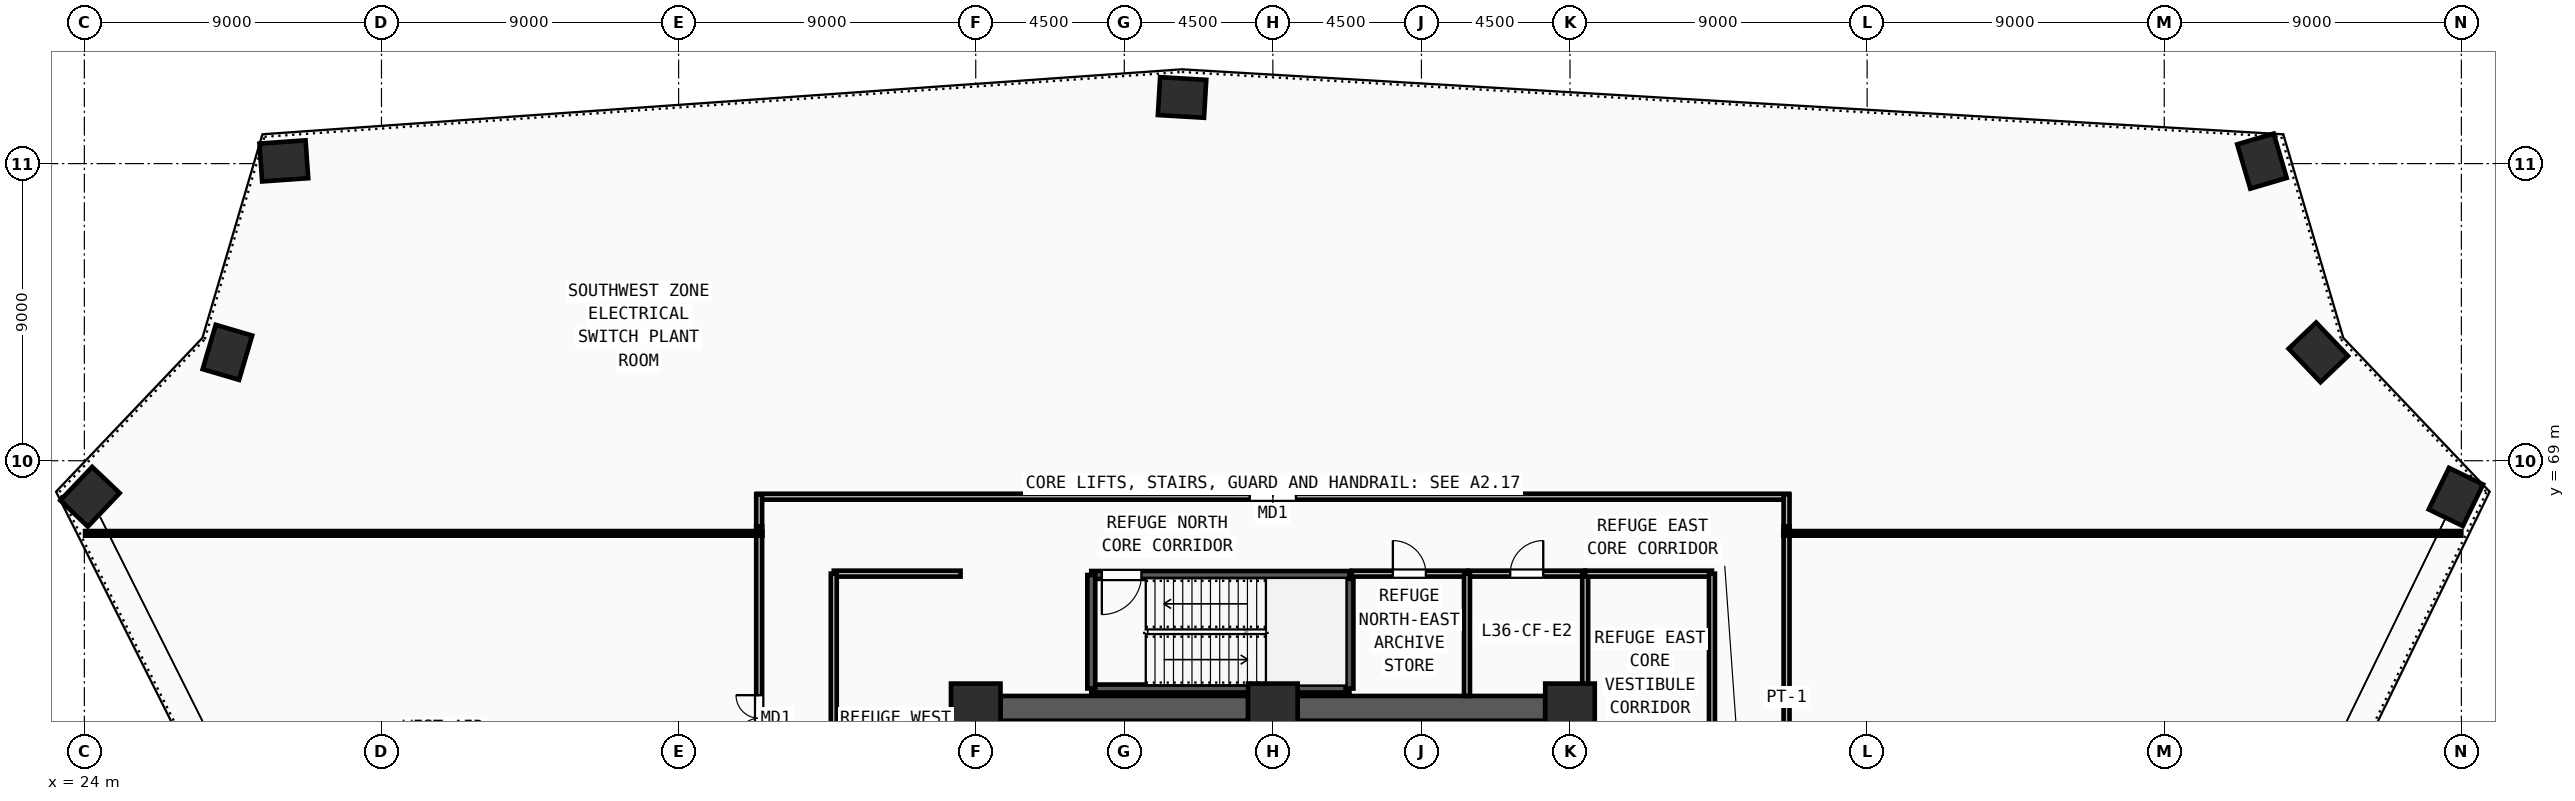
"""IFC4 building model, lengths in metres.
Left out: names, types, materials, properties, quantities, classifications, styles, units other than length and angle.
Written with IfcOpenShell. Run it as: python <this file> out.ifc"""

import sys

from ifc_helpers import new_model, si_unit, direction, frame, frame_2d, origin, origin_2d, place, context, subcontext, project, spatial, rectangle, extrude, source, transform, mapped, element, fill, save


model = new_model("IFC4")
c1 = context("Model", 3, precision=1e-05, world=origin(), true_north=direction((0.0, 1.0)))
c2 = subcontext(c1, "Body", "Model", "MODEL_VIEW")
j1 = project(units=[si_unit("LENGTHUNIT", "METRE"), si_unit("PLANEANGLEUNIT", "RADIAN")], contexts=[c1])
p1 = place(None, origin())
s1 = spatial("IfcSite", under=j1, at=p1, CompositionType="ELEMENT")
p2 = place(p1, origin())
s2 = spatial("IfcBuilding", under=s1, at=p2, CompositionType="ELEMENT")
p3 = place(p2, frame((0.0, 0.0, 139.5)))
s3 = spatial("IfcBuildingStorey", under=s2, at=p3, CompositionType="ELEMENT", Elevation=139.5)
m1 = source(origin(), c2, "Body", "SweptSolid", [
    extrude(rectangle(XDim=1.5, YDim=1.5, at=origin_2d()), origin(), (0.0, 0.0, 1.0), 4.5),
])
for number, where, z_axis, x_axis in (
    (1, (69.0, 61.5, 0.0), (0.0, 0.0, 1.0), (1.0, 0.0, 0.0)),
    (2, (60.0, 61.5, 0.0), (0.0, 0.0, 1.0), (1.0, 0.0, 0.0)),
    (3, (51.0, 61.5, 0.0), (0.0, 0.0, 1.0), (1.0, 0.0, 0.0)),
):
    element("IfcColumn", number, at=place(p3, frame(where, z_axis=z_axis, x_axis=x_axis)), inside=s3, PredefinedType="COLUMN", context=c2, shape_type="MappedRepresentation", body=[
        mapped(m1, transform((0.0, 0.0, 0.0), x_axis=(1.0, 0.0, 0.0), y_axis=(0.0, 1.0, 0.0), z_axis=(0.0, 0.0, 1.0), scale=1.0)),
    ])
m2 = source(origin(), c2, "Body", "SweptSolid", [
    extrude(rectangle(XDim=1.4, YDim=1.15, at=origin_2d()), origin(), (0.0, 0.0, 1.0), 4.5),
])
for number, where, z_axis, x_axis in (
    (4, (24.171, 67.909, 0.0), (0.0, 0.0, 1.0), (0.689, 0.724, 0.0)),
    (5, (28.333, 72.283, 0.0), (0.0, 0.0, 1.0), (0.283, 0.959, 0.0)),
    (6, (30.043, 78.082, 0.0), (0.0, 0.0, 1.0), (0.998, 0.07, 0.0)),
    (7, (57.25, 80.004, 0.0), (0.0, 0.0, 1.0), (-0.998, 0.059, 0.0)),
    (8, (89.96, 78.075, 0.0), (0.0, 0.0, 1.0), (-0.283, 0.959, 0.0)),
    (9, (91.667, 72.283, 0.0), (0.0, 0.0, 1.0), (-0.689, 0.724, 0.0)),
    (10, (95.834, 67.903, 0.0), (0.0, 0.0, 1.0), (0.438, 0.899, 0.0)),
):
    element("IfcColumn", number, at=place(p3, frame(where, z_axis=z_axis, x_axis=x_axis)), inside=s3, PredefinedType="COLUMN", context=c2, shape_type="MappedRepresentation", body=[
        mapped(m2, transform((0.0, 0.0, 0.0), x_axis=(1.0, 0.0, 0.0), y_axis=(0.0, 1.0, 0.0), z_axis=(0.0, 0.0, 1.0), scale=1.0)),
    ])
for number, where, z_axis, x_axis in (
    (11, (51.75, 61.5, 0.0), (0.0, 0.0, 1.0), (1.0, 0.0, 0.0)),
    (12, (60.75, 61.5, 0.0), (0.0, 0.0, 1.0), (1.0, 0.0, 0.0)),
):
    element("IfcWall", number, at=place(p3, frame(where, z_axis=z_axis, x_axis=x_axis)), inside=s3, PredefinedType="SHEAR", context=c2, shape_type="SweptSolid", body=[
        extrude(rectangle(XDim=7.5, YDim=0.75, at=frame_2d((3.75, 0.0))), origin(), (0.0, 0.0, 1.0), 4.32),
    ])
p4 = place(p3, frame((54.5, 62.1, 0.0), z_axis=(0.0, 0.0, 1.0), x_axis=(1.0, 0.0, 0.0)))
e13 = element("IfcWall", 13, at=p4, inside=s3, PredefinedType="SOLIDWALL", context=c2, shape_type="SweptSolid", body=[
    extrude(rectangle(XDim=7.82, YDim=0.24, at=frame_2d((3.91, 0.0))), origin(), (0.0, 0.0, 1.0), 4.32),
])
p5 = place(p3, frame((62.32, 62.1, 0.0), z_axis=(0.0, 0.0, 1.0), x_axis=(0.0, 1.0, 0.0)))
e14 = element("IfcWall", 14, at=p5, inside=s3, PredefinedType="SOLIDWALL", context=c2, shape_type="SweptSolid", body=[
    extrude(rectangle(XDim=3.44, YDim=0.24, at=frame_2d((1.72, 0.0))), origin(), (0.0, 0.0, 1.0), 4.32),
])
p6 = place(p3, frame((62.32, 65.54, 0.0), z_axis=(0.0, 0.0, 1.0), x_axis=(-1.0, 0.0, 0.0)))
e15 = element("IfcWall", 15, at=p6, inside=s3, PredefinedType="SOLIDWALL", context=c2, shape_type="SweptSolid", body=[
    extrude(rectangle(XDim=7.82, YDim=0.24, at=frame_2d((3.91, 0.0))), origin(), (0.0, 0.0, 1.0), 4.32),
])
m3 = source(origin(), c2, "Body", "SweptSolid", [
    extrude(rectangle(XDim=1.2, YDim=2.2, at=frame_2d((0.6, 1.1))), frame((0.0, 0.13, 0.0), z_axis=(0.0, -1.0, 0.0), x_axis=(1.0, 0.0, 0.0)), (0.0, 0.0, 1.0), 0.26),
])
p7 = place(p6, frame((6.3, 0.0, 0.0)))
e16 = element("IfcOpeningElement", 16, at=p7, cuts=e15, PredefinedType="OPENING", context=c2, shape_type="MappedRepresentation", body=[
    mapped(m3, transform((0.0, 0.0, 0.0), x_axis=(1.0, 0.0, 0.0), y_axis=(0.0, 1.0, 0.0), z_axis=(0.0, 0.0, 1.0), scale=1.0)),
])
p8 = place(p3, frame((54.5, 65.54, 0.0), z_axis=(0.0, 0.0, 1.0), x_axis=(0.0, -1.0, 0.0)))
e17 = element("IfcWall", 17, at=p8, inside=s3, PredefinedType="SOLIDWALL", context=c2, shape_type="SweptSolid", body=[
    extrude(rectangle(XDim=3.44, YDim=0.24, at=frame_2d((1.72, 0.0))), origin(), (0.0, 0.0, 1.0), 4.32),
])
p9 = place(p3, frame((62.39, 65.58, 0.0), z_axis=(0.0, 0.0, 1.0), x_axis=(1.0, 0.0, 0.0)))
e18 = element("IfcWall", 18, at=p9, inside=s3, PredefinedType="PARTITIONING", context=c2, shape_type="SweptSolid", body=[
    extrude(rectangle(XDim=3.49, YDim=0.18, at=frame_2d((1.745, 0.0))), origin(), (0.0, 0.0, 1.0), 4.32),
])
m4 = source(origin(), c2, "Body", "SweptSolid", [
    extrude(rectangle(XDim=1.0, YDim=2.2, at=frame_2d((0.5, 1.1))), frame((0.0, 0.1, 0.0), z_axis=(0.0, -1.0, 0.0), x_axis=(1.0, 0.0, 0.0)), (0.0, 0.0, 1.0), 0.2),
])
p10 = place(p9, frame((1.245, 0.0, 0.0)))
e19 = element("IfcOpeningElement", 19, at=p10, cuts=e18, PredefinedType="OPENING", context=c2, shape_type="MappedRepresentation", body=[
    mapped(m4, transform((0.0, 0.0, 0.0), x_axis=(1.0, 0.0, 0.0), y_axis=(0.0, 1.0, 0.0), z_axis=(0.0, 0.0, 1.0), scale=1.0)),
])
p11 = place(p3, frame((65.92, 65.58, 0.0), z_axis=(0.0, 0.0, 1.0), x_axis=(1.0, 0.0, 0.0)))
e20 = element("IfcWall", 20, at=p11, inside=s3, PredefinedType="PARTITIONING", context=c2, shape_type="SweptSolid", body=[
    extrude(rectangle(XDim=3.54, YDim=0.18, at=frame_2d((1.77, 0.0))), origin(), (0.0, 0.0, 1.0), 4.32),
])
p12 = place(p11, frame((1.27, 0.0, 0.0)))
e21 = element("IfcOpeningElement", 21, at=p12, cuts=e20, PredefinedType="OPENING", context=c2, shape_type="MappedRepresentation", body=[
    mapped(m4, transform((0.0, 0.0, 0.0), x_axis=(1.0, 0.0, 0.0), y_axis=(0.0, 1.0, 0.0), z_axis=(0.0, 0.0, 1.0), scale=1.0)),
])
p13 = place(p3, frame((75.56, 67.015, 0.0), z_axis=(0.0, 0.0, 1.0), x_axis=(0.0, -1.0, 0.0)))
e22 = element("IfcWall", 22, at=p13, inside=s3, PredefinedType="PARTITIONING", context=c2, shape_type="SweptSolid", body=[
    extrude(rectangle(XDim=22.43, YDim=0.18, at=frame_2d((11.215, 0.0))), origin(), (0.0, 0.0, 1.0), 3.905),
])
m5 = source(origin(), c2, "Body", "SweptSolid", [
    extrude(rectangle(XDim=1.3, YDim=2.2, at=frame_2d((0.65, 1.1))), frame((0.0, 0.1, 0.0), z_axis=(0.0, -1.0, 0.0), x_axis=(1.0, 0.0, 0.0)), (0.0, 0.0, 1.0), 0.2),
])
p14 = place(p13, frame((10.565, 0.0, 0.0)))
e23 = element("IfcOpeningElement", 23, at=p14, cuts=e22, PredefinedType="OPENING", context=c2, shape_type="MappedRepresentation", body=[
    mapped(m5, transform((0.0, 0.0, 0.0), x_axis=(1.0, 0.0, 0.0), y_axis=(0.0, 1.0, 0.0), z_axis=(0.0, 0.0, 1.0), scale=1.0)),
])
p15 = place(p3, frame((44.37, 67.91, 0.0), z_axis=(0.0, 0.0, 1.0), x_axis=(1.0, 0.0, 0.0)))
e24 = element("IfcWall", 24, at=p15, inside=s3, PredefinedType="PARTITIONING", context=c2, shape_type="SweptSolid", body=[
    extrude(rectangle(XDim=31.26, YDim=0.18, at=frame_2d((15.63, 0.0))), origin(), (0.0, 0.0, 1.0), 4.32),
])
m6 = source(origin(), c2, "Body", "SweptSolid", [
    extrude(rectangle(XDim=1.4, YDim=2.25, at=frame_2d((0.7, 1.125))), frame((0.0, 0.1, 0.0), z_axis=(0.0, -1.0, 0.0), x_axis=(1.0, 0.0, 0.0)), (0.0, 0.0, 1.0), 0.2),
])
p16 = place(p15, frame((14.93, 0.0, 0.0)))
e25 = element("IfcOpeningElement", 25, at=p16, cuts=e24, PredefinedType="OPENING", context=c2, shape_type="MappedRepresentation", body=[
    mapped(m6, transform((0.0, 0.0, 0.0), x_axis=(1.0, 0.0, 0.0), y_axis=(0.0, 1.0, 0.0), z_axis=(0.0, 0.0, 1.0), scale=1.0)),
])
p17 = place(p3, frame((44.44, 55.98, 0.0), z_axis=(0.0, 0.0, 1.0), x_axis=(0.0, 1.0, 0.0)))
e26 = element("IfcWall", 26, at=p17, inside=s3, PredefinedType="PARTITIONING", context=c2, shape_type="SweptSolid", body=[
    extrude(rectangle(XDim=11.035, YDim=0.18, at=frame_2d((5.518, 0.0))), origin(), (0.0, 0.0, 1.0), 4.32),
])
p18 = place(p17, frame((4.518, 0.0, 0.0)))
e27 = element("IfcOpeningElement", 27, at=p18, cuts=e26, PredefinedType="OPENING", context=c2, shape_type="MappedRepresentation", body=[
    mapped(m6, transform((0.0, 0.0, 0.0), x_axis=(1.0, 0.0, 0.0), y_axis=(0.0, 1.0, 0.0), z_axis=(0.0, 0.0, 1.0), scale=1.0)),
])
p19 = place(p3, frame((65.88, 61.875, 0.0), z_axis=(0.0, 0.0, 1.0), x_axis=(0.0, 1.0, 0.0)))
e28 = element("IfcWall", 28, at=p19, inside=s3, PredefinedType="PARTITIONING", context=c2, shape_type="SweptSolid", body=[
    extrude(rectangle(XDim=3.705, YDim=0.18, at=frame_2d((1.853, 0.0))), origin(), (0.0, 0.0, 1.0), 4.32),
])
p20 = place(p3, frame((69.46, 61.95, 0.0), z_axis=(0.0, 0.0, 1.0), x_axis=(0.0, 1.0, 0.0)))
e29 = element("IfcWall", 29, at=p20, inside=s3, PredefinedType="PARTITIONING", context=c2, shape_type="SweptSolid", body=[
    extrude(rectangle(XDim=3.63, YDim=0.18, at=frame_2d((1.815, 0.0))), origin(), (0.0, 0.0, 1.0), 4.32),
])
for number, where, z_axis, x_axis in (
    (30, (46.7, 65.58, 0.0), (0.0, 0.0, 1.0), (1.0, 0.0, 0.0)),
    (31, (69.46, 65.58, 0.0), (0.0, 0.0, 1.0), (1.0, 0.0, 0.0)),
):
    element("IfcWall", number, at=place(p3, frame(where, z_axis=z_axis, x_axis=x_axis)), inside=s3, PredefinedType="PARTITIONING", context=c2, shape_type="SweptSolid", body=[
        extrude(rectangle(XDim=3.84, YDim=0.18, at=frame_2d((1.92, 0.0))), origin(), (0.0, 0.0, 1.0), 4.32),
    ])
for number, where, z_axis, x_axis in (
    (32, (46.7, 60.06, 0.0), (0.0, 0.0, 1.0), (0.0, 1.0, 0.0)),
    (33, (73.3, 60.06, 0.0), (0.0, 0.0, 1.0), (0.0, 1.0, 0.0)),
):
    element("IfcWall", number, at=place(p3, frame(where, z_axis=z_axis, x_axis=x_axis)), inside=s3, PredefinedType="PARTITIONING", context=c2, shape_type="SweptSolid", body=[
        extrude(rectangle(XDim=5.52, YDim=0.18, at=frame_2d((2.76, 0.0))), origin(), (0.0, 0.0, 1.0), 4.32),
    ])
for number, where, z_axis, x_axis in (
    (34, (44.44, 67.015, 0.0), (0.0, 0.0, 1.0), (0.0, 1.0, 0.0)),
    (35, (75.56, 67.98, 0.0), (0.0, 0.0, 1.0), (0.0, -1.0, 0.0)),
):
    element("IfcWall", number, at=place(p3, frame(where, z_axis=z_axis, x_axis=x_axis)), inside=s3, PredefinedType="PARTITIONING", context=c2, shape_type="SweptSolid", body=[
        extrude(rectangle(XDim=0.965, YDim=0.18, at=frame_2d((0.482, 0.0))), origin(), (0.0, 0.0, 1.0), 4.32),
    ])
p21 = place(p3, frame((44.54, 66.8, 0.0), z_axis=(0.0, 0.0, 1.0), x_axis=(-1.0, 0.0, 0.0)))
e36 = element("IfcWall", 36, at=p21, inside=s3, PredefinedType="PARTITIONING", context=c2, shape_type="SweptSolid", body=[
    extrude(rectangle(XDim=20.518, YDim=0.14, at=frame_2d((10.259, 0.0))), origin(), (0.0, 0.0, 1.0), 3.505),
])
p22 = place(p3, frame((75.46, 66.8, 0.0), z_axis=(0.0, 0.0, 1.0), x_axis=(1.0, 0.0, 0.0)))
e37 = element("IfcWall", 37, at=p22, inside=s3, PredefinedType="PARTITIONING", context=c2, shape_type="SweptSolid", body=[
    extrude(rectangle(XDim=20.538, YDim=0.14, at=frame_2d((10.269, 0.0))), origin(), (0.0, 0.0, 1.0), 3.505),
])
m7 = source(origin(), c2, "Body", "SweptSolid", [
    extrude(rectangle(XDim=1.2, YDim=2.2, at=frame_2d((0.6, 1.1))), frame((0.0, 0.025, 0.0), z_axis=(0.0, -1.0, 0.0), x_axis=(1.0, 0.0, 0.0)), (0.0, 0.0, 1.0), 0.05),
])
p23 = place(p7, origin())
e38 = element("IfcDoor", 38, at=p23, inside=s3, OperationType="SINGLE_SWING_RIGHT", PredefinedType="DOOR", context=c2, shape_type="MappedRepresentation", body=[
    mapped(m7, transform((0.0, 0.0, 0.0), x_axis=(1.0, 0.0, 0.0), y_axis=(0.0, 1.0, 0.0), z_axis=(0.0, 0.0, 1.0), scale=1.0)),
])
fill(e16, e38)
m8 = source(origin(), c2, "Body", "SweptSolid", [
    extrude(rectangle(XDim=1.0, YDim=2.2, at=frame_2d((0.5, 1.1))), frame((0.0, 0.025, 0.0), z_axis=(0.0, -1.0, 0.0), x_axis=(1.0, 0.0, 0.0)), (0.0, 0.0, 1.0), 0.05),
])
p24 = place(p10, origin())
e39 = element("IfcDoor", 39, at=p24, inside=s3, OperationType="SINGLE_SWING_LEFT", PredefinedType="DOOR", context=c2, shape_type="MappedRepresentation", body=[
    mapped(m8, transform((0.0, 0.0, 0.0), x_axis=(1.0, 0.0, 0.0), y_axis=(0.0, 1.0, 0.0), z_axis=(0.0, 0.0, 1.0), scale=1.0)),
])
fill(e19, e39)
p25 = place(p12, origin())
e40 = element("IfcDoor", 40, at=p25, inside=s3, OperationType="SINGLE_SWING_RIGHT", PredefinedType="DOOR", context=c2, shape_type="MappedRepresentation", body=[
    mapped(m8, transform((0.0, 0.0, 0.0), x_axis=(1.0, 0.0, 0.0), y_axis=(0.0, 1.0, 0.0), z_axis=(0.0, 0.0, 1.0), scale=1.0)),
])
fill(e21, e40)
m9 = source(origin(), c2, "Body", "SweptSolid", [
    extrude(rectangle(XDim=1.4, YDim=2.25, at=frame_2d((0.7, 1.125))), frame((0.0, 0.025, 0.0), z_axis=(0.0, -1.0, 0.0), x_axis=(1.0, 0.0, 0.0)), (0.0, 0.0, 1.0), 0.05),
])
p26 = place(p16, origin())
e41 = element("IfcDoor", 41, at=p26, inside=s3, OperationType="DOUBLE_DOOR_SINGLE_SWING", PredefinedType="DOOR", context=c2, shape_type="MappedRepresentation", body=[
    mapped(m9, transform((0.0, 0.0, 0.0), x_axis=(1.0, 0.0, 0.0), y_axis=(0.0, 1.0, 0.0), z_axis=(0.0, 0.0, 1.0), scale=1.0)),
])
fill(e25, e41)
p27 = place(p18, origin())
e42 = element("IfcDoor", 42, at=p27, inside=s3, OperationType="DOUBLE_DOOR_SINGLE_SWING", PredefinedType="DOOR", context=c2, shape_type="MappedRepresentation", body=[
    mapped(m9, transform((0.0, 0.0, 0.0), x_axis=(1.0, 0.0, 0.0), y_axis=(0.0, 1.0, 0.0), z_axis=(0.0, 0.0, 1.0), scale=1.0)),
])
fill(e27, e42)
save(model, sys.argv[1])
